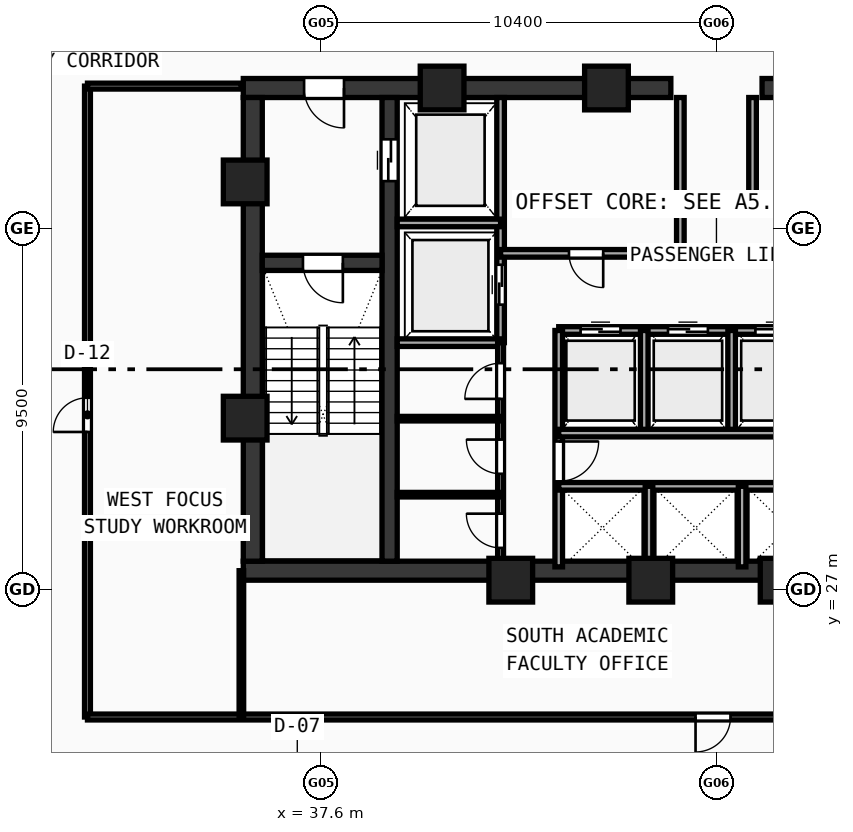
"""IFC4 building model, lengths in metres.
Left out: names, types, materials, properties, quantities, classifications, styles, units other than length and angle.
Written with IfcOpenShell. Run it as: python <this file> out.ifc"""

import sys

from ifc_helpers import new_model, si_unit, direction, frame, frame_2d, origin, origin_with_axes, origin_2d, place, context, subcontext, project, spatial, rectangle, hollow_rectangle, extrude, source, transform, mapped, element, fill, save


model = new_model("IFC4")
c1 = context("Model", 3, precision=1e-05, world=origin(), true_north=direction((0.0, 1.0)))
c2 = subcontext(c1, "Body", "Model", "MODEL_VIEW")
j1 = project(units=[si_unit("LENGTHUNIT", "METRE"), si_unit("PLANEANGLEUNIT", "RADIAN")], contexts=[c1])
p1 = place(None, origin())
s1 = spatial("IfcSite", under=j1, at=p1, CompositionType="ELEMENT")
p2 = place(p1, origin())
s2 = spatial("IfcBuilding", under=s1, at=p2, CompositionType="ELEMENT")
p3 = place(p2, frame((0.0, 0.0, 199.96)))
s3 = spatial("IfcBuildingStorey", under=s2, at=p3, CompositionType="ELEMENT", Elevation=199.96)
p4 = place(p3, frame((35.55, 27.5, 0.0), z_axis=(0.0, 0.0, 1.0), x_axis=(1.0, 0.0, 0.0)))
e1 = element("IfcWall", 1, at=p4, inside=s3, PredefinedType="SHEAR", context=c2, shape_type="SweptSolid", body=[
    extrude(rectangle(XDim=24.9, YDim=0.5, at=frame_2d((12.45, 0.0))), origin(), (0.0, 0.0, 1.0), 3.54),
])
p5 = place(p3, frame((35.55, 40.2, 0.0), z_axis=(0.0, 0.0, 1.0), x_axis=(1.0, 0.0, 0.0)))
e2 = element("IfcWall", 2, at=p5, inside=s3, PredefinedType="SHEAR", context=c2, shape_type="SweptSolid", body=[
    extrude(rectangle(XDim=11.25, YDim=0.5, at=frame_2d((5.625, 0.0))), origin(), (0.0, 0.0, 1.0), 3.54),
])
p6 = place(p5, frame((1.6, 0.0, 0.0)))
e3 = element("IfcOpeningElement", 3, at=p6, cuts=e2, PredefinedType="OPENING", context=c2, shape_type="SweptSolid", body=[
    extrude(rectangle(XDim=1.05, YDim=2.1, at=frame_2d((0.525, 1.05))), frame((0.0, 0.26, 0.0), z_axis=(0.0, -1.0, 0.0), x_axis=(1.0, 0.0, 0.0)), (0.0, 0.0, 1.0), 0.52),
])
p7 = place(p3, frame((49.2, 40.2, 0.0), z_axis=(0.0, 0.0, 1.0), x_axis=(1.0, 0.0, 0.0)))
e4 = element("IfcWall", 4, at=p7, inside=s3, PredefinedType="SHEAR", context=c2, shape_type="SweptSolid", body=[
    extrude(rectangle(XDim=11.25, YDim=0.5, at=frame_2d((5.625, 0.0))), origin(), (0.0, 0.0, 1.0), 3.54),
])
p8 = place(p7, frame((8.6, 0.0, 0.0)))
e5 = element("IfcOpeningElement", 5, at=p8, cuts=e4, PredefinedType="OPENING", context=c2, shape_type="SweptSolid", body=[
    extrude(rectangle(XDim=1.05, YDim=2.1, at=frame_2d((0.525, 1.05))), frame((0.0, 0.26, 0.0), z_axis=(0.0, -1.0, 0.0), x_axis=(1.0, 0.0, 0.0)), (0.0, 0.0, 1.0), 0.52),
])
p9 = place(p3, frame((35.8, 27.75, 0.0), z_axis=(0.0, 0.0, 1.0), x_axis=(0.0, 1.0, 0.0)))
e6 = element("IfcWall", 6, at=p9, inside=s3, PredefinedType="SHEAR", context=c2, shape_type="SweptSolid", body=[
    extrude(rectangle(XDim=12.2, YDim=0.5, at=frame_2d((6.1, 0.0))), origin(), (0.0, 0.0, 1.0), 3.54),
])
p10 = place(p3, frame((39.4, 27.75, 0.0), z_axis=(0.0, 0.0, 1.0), x_axis=(0.0, 1.0, 0.0)))
e7 = element("IfcWall", 7, at=p10, inside=s3, PredefinedType="SHEAR", context=c2, shape_type="SweptSolid", body=[
    extrude(rectangle(XDim=12.2, YDim=0.4, at=frame_2d((6.1, 0.0))), origin(), (0.0, 0.0, 1.0), 3.54),
])
p11 = place(p10, frame((10.0, 0.0, 0.0)))
e8 = element("IfcOpeningElement", 8, at=p11, cuts=e7, PredefinedType="OPENING", context=c2, shape_type="SweptSolid", body=[
    extrude(rectangle(XDim=1.1, YDim=2.1, at=frame_2d((0.55, 1.05))), frame((0.0, 0.21, 0.0), z_axis=(0.0, -1.0, 0.0), x_axis=(1.0, 0.0, 0.0)), (0.0, 0.0, 1.0), 0.42),
])
p12 = place(p3, frame((36.05, 35.6, 0.0), z_axis=(0.0, 0.0, 1.0), x_axis=(1.0, 0.0, 0.0)))
e9 = element("IfcWall", 9, at=p12, inside=s3, PredefinedType="SHEAR", context=c2, shape_type="SweptSolid", body=[
    extrude(rectangle(XDim=3.15, YDim=0.4, at=frame_2d((1.575, 0.0))), origin(), (0.0, 0.0, 1.0), 3.54),
])
p13 = place(p12, frame((1.07, 0.0, 0.0)))
e10 = element("IfcOpeningElement", 10, at=p13, cuts=e9, PredefinedType="OPENING", context=c2, shape_type="SweptSolid", body=[
    extrude(rectangle(XDim=1.05, YDim=2.1, at=frame_2d((0.525, 1.05))), frame((0.0, 0.21, 0.0), z_axis=(0.0, -1.0, 0.0), x_axis=(1.0, 0.0, 0.0)), (0.0, 0.0, 1.0), 0.42),
])
m1 = source(origin(), c2, "Body", "SweptSolid", [
    extrude(hollow_rectangle(XDim=1.15, YDim=1.15, WallThickness=0.048, at=origin_2d()), origin(), (0.0, 0.0, 1.0), 3.8),
])
for number, where, z_axis, x_axis in (
    (11, (42.588, 27.25, -0.26), (0.0, 0.0, 1.0), (1.0, 0.0, 0.0)),
    (12, (46.272, 27.25, -0.26), (0.0, 0.0, 1.0), (1.0, 0.0, 0.0)),
    (13, (49.729, 27.25, -0.26), (0.0, 0.0, 1.0), (1.0, 0.0, 0.0)),
    (14, (45.106, 40.2, -0.26), (0.0, 0.0, 1.0), (1.0, 0.0, 0.0)),
    (15, (40.781, 40.2, -0.26), (0.0, 0.0, 1.0), (1.0, 0.0, 0.0)),
    (16, (35.6, 37.729, -0.26), (0.0, 0.0, 1.0), (1.0, 0.0, 0.0)),
    (17, (35.6, 31.513, -0.26), (0.0, 0.0, 1.0), (1.0, 0.0, 0.0)),
):
    element("IfcColumn", number, at=place(p3, frame(where, z_axis=z_axis, x_axis=x_axis)), inside=s3, PredefinedType="COLUMN", context=c2, shape_type="MappedRepresentation", body=[
        mapped(m1, transform((0.0, 0.0, 0.0), scale=1.0)),
    ])
p14 = place(p3, frame((42.32, 33.5, 0.0), z_axis=(0.0, 0.0, 1.0), x_axis=(0.0, 1.0, 0.0)))
e18 = element("IfcWall", 18, at=p14, inside=s3, PredefinedType="SOLIDWALL", context=c2, shape_type="SweptSolid", body=[
    extrude(rectangle(XDim=6.45, YDim=0.2, at=frame_2d((3.225, 0.0))), origin(), (0.0, 0.0, 1.0), 3.54),
])
p15 = place(p14, frame((1.0, 0.0, 0.0)))
e19 = element("IfcOpeningElement", 19, at=p15, cuts=e18, PredefinedType="OPENING", context=c2, shape_type="SweptSolid", body=[
    extrude(rectangle(XDim=1.05, YDim=2.1, at=frame_2d((0.525, 1.05))), frame((0.0, 0.11, 0.0), z_axis=(0.0, -1.0, 0.0), x_axis=(1.0, 0.0, 0.0)), (0.0, 0.0, 1.0), 0.22),
])
for number, where, z_axis, x_axis in (
    (20, (39.6, 36.65, 0.0), (0.0, 0.0, 1.0), (1.0, 0.0, 0.0)),
    (21, (39.6, 33.5, 0.0), (0.0, 0.0, 1.0), (1.0, 0.0, 0.0)),
):
    element("IfcWall", number, at=place(p3, frame(where, z_axis=z_axis, x_axis=x_axis)), inside=s3, PredefinedType="SOLIDWALL", context=c2, shape_type="SweptSolid", body=[
        extrude(rectangle(XDim=2.72, YDim=0.2, at=frame_2d((1.36, 0.0))), origin(), (0.0, 0.0, 1.0), 3.54),
    ])
p16 = place(p3, frame((42.32, 35.85, 0.0), z_axis=(0.0, 0.0, 1.0), x_axis=(1.0, 0.0, 0.0)))
e22 = element("IfcWall", 22, at=p16, inside=s3, PredefinedType="SOLIDWALL", context=c2, shape_type="SweptSolid", body=[
    extrude(rectangle(XDim=4.73, YDim=0.2, at=frame_2d((2.365, 0.0))), origin(), (0.0, 0.0, 1.0), 3.54),
])
p17 = place(p16, frame((1.8, 0.0, 0.0)))
e23 = element("IfcOpeningElement", 23, at=p17, cuts=e22, PredefinedType="OPENING", context=c2, shape_type="SweptSolid", body=[
    extrude(rectangle(XDim=0.9, YDim=2.1, at=frame_2d((0.45, 1.05))), frame((0.0, 0.11, 0.0), z_axis=(0.0, -1.0, 0.0), x_axis=(1.0, 0.0, 0.0)), (0.0, 0.0, 1.0), 0.22),
])
p18 = place(p3, frame((48.95, 37.32, 0.0), z_axis=(0.0, 0.0, 1.0), x_axis=(1.0, 0.0, 0.0)))
e24 = element("IfcWall", 24, at=p18, inside=s3, PredefinedType="SOLIDWALL", context=c2, shape_type="SweptSolid", body=[
    extrude(rectangle(XDim=4.73, YDim=0.2, at=frame_2d((2.365, 0.0))), origin(), (0.0, 0.0, 1.0), 3.54),
])
p19 = place(p18, frame((1.8, 0.0, 0.0)))
e25 = element("IfcOpeningElement", 25, at=p19, cuts=e24, PredefinedType="OPENING", context=c2, shape_type="SweptSolid", body=[
    extrude(rectangle(XDim=0.9, YDim=2.1, at=frame_2d((0.45, 1.05))), frame((0.0, 0.11, 0.0), z_axis=(0.0, -1.0, 0.0), x_axis=(1.0, 0.0, 0.0)), (0.0, 0.0, 1.0), 0.22),
])
p20 = place(p3, frame((47.05, 35.85, 0.0), z_axis=(0.0, 0.0, 1.0), x_axis=(0.0, 1.0, 0.0)))
e26 = element("IfcWall", 26, at=p20, inside=s3, PredefinedType="SOLIDWALL", context=c2, shape_type="SweptSolid", body=[
    extrude(rectangle(XDim=4.1, YDim=0.2, at=frame_2d((2.05, 0.0))), origin(), (0.0, 0.0, 1.0), 3.54),
])
p21 = place(p3, frame((48.95, 37.32, 0.0), z_axis=(0.0, 0.0, 1.0), x_axis=(0.0, 1.0, 0.0)))
e27 = element("IfcWall", 27, at=p21, inside=s3, PredefinedType="SOLIDWALL", context=c2, shape_type="SweptSolid", body=[
    extrude(rectangle(XDim=2.63, YDim=0.2, at=frame_2d((1.315, 0.0))), origin(), (0.0, 0.0, 1.0), 3.54),
])
p22 = place(p3, frame((43.85, 33.82, 0.0), z_axis=(0.0, 0.0, 1.0), x_axis=(1.0, 0.0, 0.0)))
e28 = element("IfcWall", 28, at=p22, inside=s3, PredefinedType="SOLIDWALL", context=c2, shape_type="SweptSolid", body=[
    extrude(rectangle(XDim=9.83, YDim=0.2, at=frame_2d((4.915, 0.0))), origin(), (0.0, 0.0, 1.0), 3.54),
])
p23 = place(p22, frame((0.575, 0.0, 0.0)))
e29 = element("IfcOpeningElement", 29, at=p23, cuts=e28, PredefinedType="OPENING", context=c2, shape_type="SweptSolid", body=[
    extrude(rectangle(XDim=1.05, YDim=2.1, at=frame_2d((0.525, 1.05))), frame((0.0, 0.11, 0.0), z_axis=(0.0, -1.0, 0.0), x_axis=(1.0, 0.0, 0.0)), (0.0, 0.0, 1.0), 0.22),
])
p24 = place(p22, frame((2.875, 0.0, 0.0)))
e30 = element("IfcOpeningElement", 30, at=p24, cuts=e28, PredefinedType="OPENING", context=c2, shape_type="SweptSolid", body=[
    extrude(rectangle(XDim=1.05, YDim=2.1, at=frame_2d((0.525, 1.05))), frame((0.0, 0.11, 0.0), z_axis=(0.0, -1.0, 0.0), x_axis=(1.0, 0.0, 0.0)), (0.0, 0.0, 1.0), 0.22),
])
p25 = place(p22, frame((5.175, 0.0, 0.0)))
e31 = element("IfcOpeningElement", 31, at=p25, cuts=e28, PredefinedType="OPENING", context=c2, shape_type="SweptSolid", body=[
    extrude(rectangle(XDim=1.05, YDim=2.1, at=frame_2d((0.525, 1.05))), frame((0.0, 0.11, 0.0), z_axis=(0.0, -1.0, 0.0), x_axis=(1.0, 0.0, 0.0)), (0.0, 0.0, 1.0), 0.22),
])
p26 = place(p22, frame((7.475, 0.0, 0.0)))
e32 = element("IfcOpeningElement", 32, at=p26, cuts=e28, PredefinedType="OPENING", context=c2, shape_type="SweptSolid", body=[
    extrude(rectangle(XDim=1.05, YDim=2.1, at=frame_2d((0.525, 1.05))), frame((0.0, 0.11, 0.0), z_axis=(0.0, -1.0, 0.0), x_axis=(1.0, 0.0, 0.0)), (0.0, 0.0, 1.0), 0.22),
])
p27 = place(p3, frame((43.85, 27.6, 0.0), z_axis=(0.0, 0.0, 1.0), x_axis=(0.0, 1.0, 0.0)))
e33 = element("IfcWall", 33, at=p27, inside=s3, PredefinedType="SOLIDWALL", context=c2, shape_type="SweptSolid", body=[
    extrude(rectangle(XDim=6.22, YDim=0.2, at=frame_2d((3.11, 0.0))), origin(), (0.0, 0.0, 1.0), 3.54),
])
p28 = place(p27, frame((2.25, 0.0, 0.0)))
e34 = element("IfcOpeningElement", 34, at=p28, cuts=e33, PredefinedType="OPENING", context=c2, shape_type="SweptSolid", body=[
    extrude(rectangle(XDim=1.05, YDim=2.1, at=frame_2d((0.525, 1.05))), frame((0.0, 0.11, 0.0), z_axis=(0.0, -1.0, 0.0), x_axis=(1.0, 0.0, 0.0)), (0.0, 0.0, 1.0), 0.22),
])
for number, where, z_axis, x_axis in (
    (35, (46.1, 31.12, 0.0), (0.0, 0.0, 1.0), (0.0, 1.0, 0.0)),
    (36, (48.4, 31.12, 0.0), (0.0, 0.0, 1.0), (0.0, 1.0, 0.0)),
):
    element("IfcWall", number, at=place(p3, frame(where, z_axis=z_axis, x_axis=x_axis)), inside=s3, PredefinedType="SOLIDWALL", context=c2, shape_type="SweptSolid", body=[
        extrude(rectangle(XDim=2.7, YDim=0.2, at=frame_2d((1.35, 0.0))), origin(), (0.0, 0.0, 1.0), 3.54),
    ])
p29 = place(p3, frame((43.85, 29.72, 0.0), z_axis=(0.0, 0.0, 1.0), x_axis=(1.0, 0.0, 0.0)))
e37 = element("IfcWall", 37, at=p29, inside=s3, PredefinedType="SOLIDWALL", context=c2, shape_type="SweptSolid", body=[
    extrude(rectangle(XDim=7.2, YDim=0.2, at=frame_2d((3.6, 0.0))), origin(), (0.0, 0.0, 1.0), 3.54),
])
p30 = place(p3, frame((43.85, 31.12, 0.0), z_axis=(0.0, 0.0, 1.0), x_axis=(1.0, 0.0, 0.0)))
e38 = element("IfcWall", 38, at=p30, inside=s3, PredefinedType="SOLIDWALL", context=c2, shape_type="SweptSolid", body=[
    extrude(rectangle(XDim=9.83, YDim=0.2, at=frame_2d((4.915, 0.0))), origin(), (0.0, 0.0, 1.0), 3.54),
])
for number, where, z_axis, x_axis in (
    (39, (46.225, 27.6, 0.0), (0.0, 0.0, 1.0), (0.0, 1.0, 0.0)),
    (40, (48.675, 27.6, 0.0), (0.0, 0.0, 1.0), (0.0, 1.0, 0.0)),
):
    element("IfcWall", number, at=place(p3, frame(where, z_axis=z_axis, x_axis=x_axis)), inside=s3, PredefinedType="SOLIDWALL", context=c2, shape_type="SweptSolid", body=[
        extrude(rectangle(XDim=2.12, YDim=0.2, at=frame_2d((1.06, 0.0))), origin(), (0.0, 0.0, 1.0), 3.54),
    ])
p31 = place(p3, frame((42.32, 27.6, 0.0), z_axis=(0.0, 0.0, 1.0), x_axis=(0.0, 1.0, 0.0)))
e41 = element("IfcWall", 41, at=p31, inside=s3, PredefinedType="PARTITIONING", context=c2, shape_type="SweptSolid", body=[
    extrude(rectangle(XDim=5.9, YDim=0.155, at=frame_2d((2.95, 0.0))), origin(), (0.0, 0.0, 1.0), 3.54),
])
p32 = place(p31, frame((0.5, 0.0, 0.0)))
e42 = element("IfcOpeningElement", 42, at=p32, cuts=e41, PredefinedType="OPENING", context=c2, shape_type="SweptSolid", body=[
    extrude(rectangle(XDim=0.9, YDim=2.1, at=frame_2d((0.45, 1.05))), frame((0.0, 0.087, 0.0), z_axis=(0.0, -1.0, 0.0), x_axis=(1.0, 0.0, 0.0)), (0.0, 0.0, 1.0), 0.175),
])
p33 = place(p31, frame((2.45, 0.0, 0.0)))
e43 = element("IfcOpeningElement", 43, at=p33, cuts=e41, PredefinedType="OPENING", context=c2, shape_type="SweptSolid", body=[
    extrude(rectangle(XDim=0.9, YDim=2.1, at=frame_2d((0.45, 1.05))), frame((0.0, 0.087, 0.0), z_axis=(0.0, -1.0, 0.0), x_axis=(1.0, 0.0, 0.0)), (0.0, 0.0, 1.0), 0.175),
])
p34 = place(p31, frame((4.42, 0.0, 0.0)))
e44 = element("IfcOpeningElement", 44, at=p34, cuts=e41, PredefinedType="OPENING", context=c2, shape_type="SweptSolid", body=[
    extrude(rectangle(XDim=0.94, YDim=2.1, at=frame_2d((0.47, 1.05))), frame((0.0, 0.087, 0.0), z_axis=(0.0, -1.0, 0.0), x_axis=(1.0, 0.0, 0.0)), (0.0, 0.0, 1.0), 0.175),
])
for number, where, z_axis, x_axis in (
    (45, (39.6, 29.5, 0.0), (0.0, 0.0, 1.0), (1.0, 0.0, 0.0)),
    (46, (39.6, 31.5, 0.0), (0.0, 0.0, 1.0), (1.0, 0.0, 0.0)),
):
    element("IfcWall", number, at=place(p3, frame(where, z_axis=z_axis, x_axis=x_axis)), inside=s3, PredefinedType="PARTITIONING", context=c2, shape_type="SweptSolid", body=[
        extrude(rectangle(XDim=2.72, YDim=0.12, at=frame_2d((1.36, 0.0))), origin(), (0.0, 0.0, 1.0), 3.54),
    ])
p35 = place(p3, frame((31.45, 23.65, 0.0), z_axis=(0.0, 0.0, 1.0), x_axis=(0.0, 1.0, 0.0)))
e47 = element("IfcWall", 47, at=p35, inside=s3, PredefinedType="PARTITIONING", context=c2, shape_type="SweptSolid", body=[
    extrude(rectangle(XDim=16.6, YDim=0.155, at=frame_2d((8.3, 0.0))), origin(), (0.0, 0.0, 1.0), 2.89),
])
p36 = place(p35, frame((7.5, 0.0, 0.0)))
e48 = element("IfcOpeningElement", 48, at=p36, cuts=e47, PredefinedType="OPENING", context=c2, shape_type="SweptSolid", body=[
    extrude(rectangle(XDim=0.9, YDim=2.08, at=frame_2d((0.45, 1.04))), frame((0.0, 0.087, 0.0), z_axis=(0.0, -1.0, 0.0), x_axis=(1.0, 0.0, 0.0)), (0.0, 0.0, 1.0), 0.175),
])
p37 = place(p3, frame((31.45, 23.65, 0.0), z_axis=(0.0, 0.0, 1.0), x_axis=(1.0, 0.0, 0.0)))
e49 = element("IfcWall", 49, at=p37, inside=s3, PredefinedType="PARTITIONING", context=c2, shape_type="SweptSolid", body=[
    extrude(rectangle(XDim=33.1, YDim=0.155, at=frame_2d((16.55, 0.0))), origin(), (0.0, 0.0, 1.0), 2.89),
])
p38 = place(p37, frame((16.0, 0.0, 0.0)))
e50 = element("IfcOpeningElement", 50, at=p38, cuts=e49, PredefinedType="OPENING", context=c2, shape_type="SweptSolid", body=[
    extrude(rectangle(XDim=0.92, YDim=2.1, at=frame_2d((0.46, 1.05))), frame((0.0, 0.087, 0.0), z_axis=(0.0, -1.0, 0.0), x_axis=(1.0, 0.0, 0.0)), (0.0, 0.0, 1.0), 0.175),
])
p39 = place(p3, frame((31.45, 40.25, 0.0), z_axis=(0.0, 0.0, 1.0), x_axis=(1.0, 0.0, 0.0)))
e51 = element("IfcWall", 51, at=p39, inside=s3, PredefinedType="PARTITIONING", context=c2, shape_type="SweptSolid", body=[
    extrude(rectangle(XDim=4.05, YDim=0.155, at=frame_2d((2.025, 0.0))), origin(), (0.0, 0.0, 1.0), 3.54),
])
p40 = place(p3, frame((35.5, 23.65, 0.0), z_axis=(0.0, 0.0, 1.0), x_axis=(0.0, 1.0, 0.0)))
e52 = element("IfcWall", 52, at=p40, inside=s3, PredefinedType="PARTITIONING", context=c2, shape_type="SweptSolid", body=[
    extrude(rectangle(XDim=3.85, YDim=0.12, at=frame_2d((1.925, 0.0))), origin(), (0.0, 0.0, 1.0), 3.14),
])
m2 = source(origin(), c2, "Body", "SweptSolid", [
    extrude(rectangle(XDim=1.05, YDim=2.1, at=frame_2d((0.525, 1.05))), frame((0.0, 0.025, 0.0), z_axis=(0.0, -1.0, 0.0), x_axis=(1.0, 0.0, 0.0)), (0.0, 0.0, 1.0), 0.05),
])
p41 = place(p13, frame((1.05, 0.0, 0.0), z_axis=(0.0, 0.0, 1.0), x_axis=(-1.0, 0.0, 0.0)))
e53 = element("IfcDoor", 53, at=p41, inside=s3, OperationType="SINGLE_SWING_LEFT", PredefinedType="DOOR", context=c2, shape_type="MappedRepresentation", body=[
    mapped(m2, transform((0.0, 0.0, 0.0), scale=1.0)),
])
fill(e10, e53)
p42 = place(p6, frame((1.05, 0.0, 0.0), z_axis=(0.0, 0.0, 1.0), x_axis=(-1.0, 0.0, 0.0)))
e54 = element("IfcDoor", 54, at=p42, inside=s3, OperationType="SINGLE_SWING_LEFT", PredefinedType="DOOR", context=c2, shape_type="MappedRepresentation", body=[
    mapped(m2, transform((0.0, 0.0, 0.0), scale=1.0)),
])
fill(e3, e54)
m3 = source(origin(), c2, "Body", "SweptSolid", [
    extrude(rectangle(XDim=1.1, YDim=2.1, at=frame_2d((0.55, 1.05))), frame((0.0, 0.025, 0.0), z_axis=(0.0, -1.0, 0.0), x_axis=(1.0, 0.0, 0.0)), (0.0, 0.0, 1.0), 0.05),
])
p43 = place(p11, frame((1.1, 0.0, 0.0), z_axis=(0.0, 0.0, 1.0), x_axis=(-1.0, 0.0, 0.0)))
e55 = element("IfcDoor", 55, at=p43, inside=s3, OperationType="DOUBLE_DOOR_SLIDING", PredefinedType="DOOR", context=c2, shape_type="MappedRepresentation", body=[
    mapped(m3, transform((0.0, 0.0, 0.0), scale=1.0)),
])
fill(e8, e55)
p44 = place(p15, origin_with_axes())
e56 = element("IfcDoor", 56, at=p44, inside=s3, OperationType="DOUBLE_DOOR_SLIDING", PredefinedType="DOOR", context=c2, shape_type="MappedRepresentation", body=[
    mapped(m2, transform((0.0, 0.0, 0.0), scale=1.0)),
])
fill(e19, e56)
m4 = source(origin(), c2, "Body", "SweptSolid", [
    extrude(rectangle(XDim=0.9, YDim=2.1, at=frame_2d((0.45, 1.05))), frame((0.0, 0.025, 0.0), z_axis=(0.0, -1.0, 0.0), x_axis=(1.0, 0.0, 0.0)), (0.0, 0.0, 1.0), 0.05),
])
p45 = place(p17, frame((0.9, 0.0, 0.0), z_axis=(0.0, 0.0, 1.0), x_axis=(-1.0, 0.0, 0.0)))
e57 = element("IfcDoor", 57, at=p45, inside=s3, OperationType="SINGLE_SWING_LEFT", PredefinedType="DOOR", context=c2, shape_type="MappedRepresentation", body=[
    mapped(m4, transform((0.0, 0.0, 0.0), scale=1.0)),
])
fill(e23, e57)
p46 = place(p23, origin_with_axes())
e58 = element("IfcDoor", 58, at=p46, inside=s3, OperationType="DOUBLE_DOOR_SLIDING", PredefinedType="DOOR", context=c2, shape_type="MappedRepresentation", body=[
    mapped(m2, transform((0.0, 0.0, 0.0), scale=1.0)),
])
fill(e29, e58)
p47 = place(p24, origin_with_axes())
e59 = element("IfcDoor", 59, at=p47, inside=s3, OperationType="DOUBLE_DOOR_SLIDING", PredefinedType="DOOR", context=c2, shape_type="MappedRepresentation", body=[
    mapped(m2, transform((0.0, 0.0, 0.0), scale=1.0)),
])
fill(e30, e59)
p48 = place(p25, origin_with_axes())
e60 = element("IfcDoor", 60, at=p48, inside=s3, OperationType="DOUBLE_DOOR_SLIDING", PredefinedType="DOOR", context=c2, shape_type="MappedRepresentation", body=[
    mapped(m2, transform((0.0, 0.0, 0.0), scale=1.0)),
])
fill(e31, e60)
p49 = place(p28, frame((1.05, 0.0, 0.0), z_axis=(0.0, 0.0, 1.0), x_axis=(-1.0, 0.0, 0.0)))
e61 = element("IfcDoor", 61, at=p49, inside=s3, OperationType="SINGLE_SWING_LEFT", PredefinedType="DOOR", context=c2, shape_type="MappedRepresentation", body=[
    mapped(m2, transform((0.0, 0.0, 0.0), scale=1.0)),
])
fill(e34, e61)
p50 = place(p32, origin_with_axes())
e62 = element("IfcDoor", 62, at=p50, inside=s3, OperationType="SINGLE_SWING_RIGHT", PredefinedType="DOOR", context=c2, shape_type="MappedRepresentation", body=[
    mapped(m4, transform((0.0, 0.0, 0.0), scale=1.0)),
])
fill(e42, e62)
p51 = place(p33, origin_with_axes())
e63 = element("IfcDoor", 63, at=p51, inside=s3, OperationType="SINGLE_SWING_RIGHT", PredefinedType="DOOR", context=c2, shape_type="MappedRepresentation", body=[
    mapped(m4, transform((0.0, 0.0, 0.0), scale=1.0)),
])
fill(e43, e63)
m5 = source(origin(), c2, "Body", "SweptSolid", [
    extrude(rectangle(XDim=0.94, YDim=2.1, at=frame_2d((0.47, 1.05))), frame((0.0, 0.025, 0.0), z_axis=(0.0, -1.0, 0.0), x_axis=(1.0, 0.0, 0.0)), (0.0, 0.0, 1.0), 0.05),
])
p52 = place(p34, origin_with_axes())
e64 = element("IfcDoor", 64, at=p52, inside=s3, OperationType="SINGLE_SWING_LEFT", PredefinedType="DOOR", context=c2, shape_type="MappedRepresentation", body=[
    mapped(m5, transform((0.0, 0.0, 0.0), scale=1.0)),
])
fill(e44, e64)
m6 = source(origin(), c2, "Body", "SweptSolid", [
    extrude(rectangle(XDim=0.9, YDim=2.08, at=frame_2d((0.45, 1.04))), frame((0.0, 0.025, 0.0), z_axis=(0.0, -1.0, 0.0), x_axis=(1.0, 0.0, 0.0)), (0.0, 0.0, 1.0), 0.05),
])
p53 = place(p36, origin_with_axes())
e65 = element("IfcDoor", 65, at=p53, inside=s3, OperationType="SINGLE_SWING_LEFT", PredefinedType="DOOR", context=c2, shape_type="MappedRepresentation", body=[
    mapped(m6, transform((0.0, 0.0, 0.0), scale=1.0)),
])
fill(e48, e65)
m7 = source(origin(), c2, "Body", "SweptSolid", [
    extrude(rectangle(XDim=0.92, YDim=2.1, at=frame_2d((0.46, 1.05))), frame((0.0, 0.025, 0.0), z_axis=(0.0, -1.0, 0.0), x_axis=(1.0, 0.0, 0.0)), (0.0, 0.0, 1.0), 0.05),
])
p54 = place(p38, frame((0.92, 0.0, 0.0), z_axis=(0.0, 0.0, 1.0), x_axis=(-1.0, 0.0, 0.0)))
e66 = element("IfcDoor", 66, at=p54, inside=s3, OperationType="SINGLE_SWING_RIGHT", PredefinedType="DOOR", context=c2, shape_type="MappedRepresentation", body=[
    mapped(m7, transform((0.0, 0.0, 0.0), scale=1.0)),
])
fill(e50, e66)
save(model, sys.argv[1])
